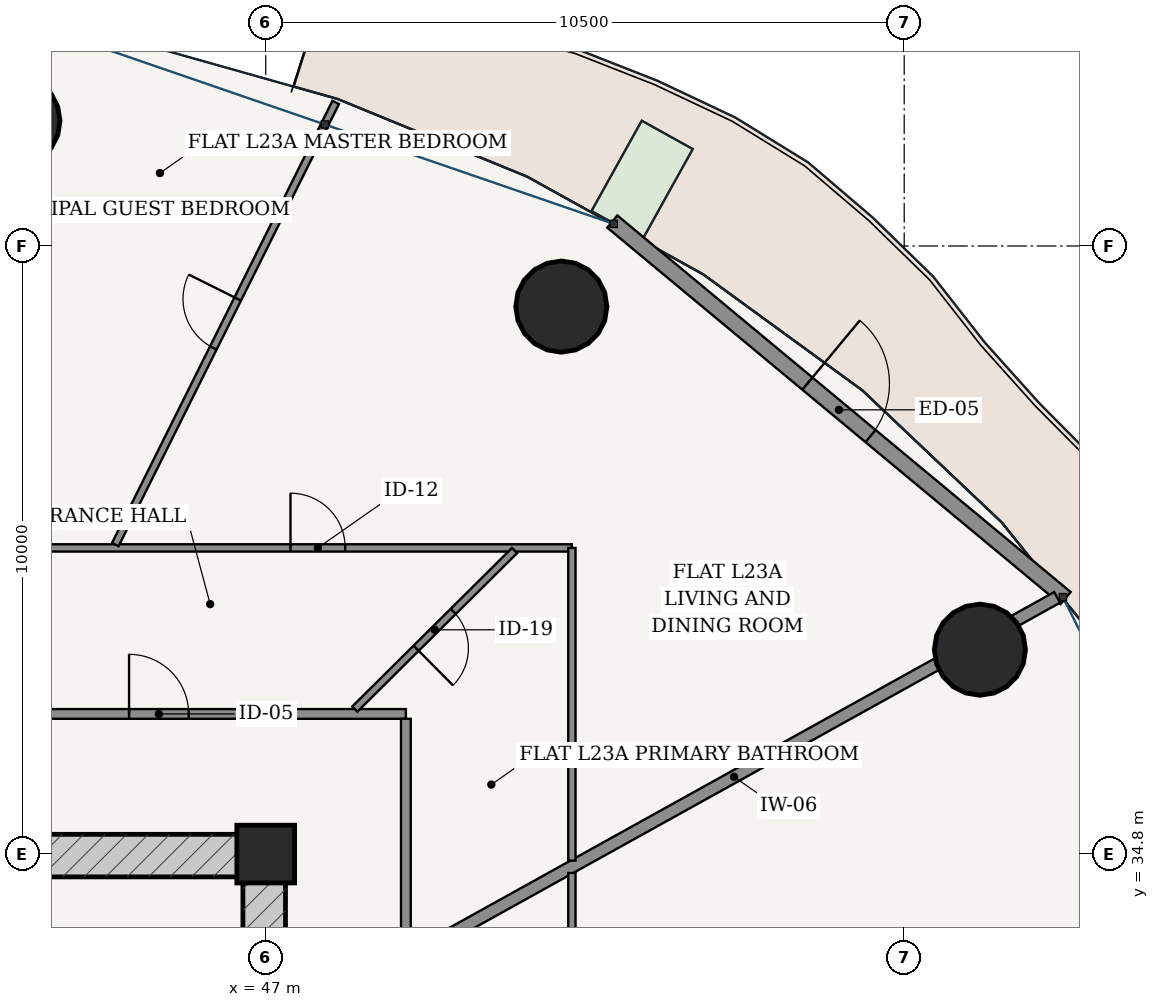
"""IFC4 building model, lengths in metres.
Left out: names, types, materials, properties, quantities, classifications, styles, units other than length and angle.
Written with IfcOpenShell. Run it as: python <this file> out.ifc"""

import sys

from ifc_helpers import new_model, si_unit, direction, frame, frame_2d, origin, origin_2d, place, context, subcontext, project, spatial, rectangle, hollow_circle, extrude, source, transform, mapped, element, fill, save


model = new_model("IFC4")
c1 = context("Model", 3, precision=1e-05, world=origin(), true_north=direction((-0.2419218956, 0.970295726276)))
c2 = subcontext(c1, "Body", "Model", "MODEL_VIEW")
j1 = project(units=[si_unit("LENGTHUNIT", "METRE"), si_unit("PLANEANGLEUNIT", "RADIAN")], contexts=[c1])
p1 = place(None, origin())
s1 = spatial("IfcSite", under=j1, at=p1, CompositionType="ELEMENT")
p2 = place(p1, origin())
s2 = spatial("IfcBuilding", under=s1, at=p2, CompositionType="ELEMENT")
p3 = place(p2, frame((0.0, 0.0, 90.6)))
s3 = spatial("IfcBuildingStorey", under=s2, at=p3, CompositionType="ELEMENT", Elevation=90.6)
p4 = place(p3, frame((47.0, 34.8, 0.0), z_axis=(0.0, 0.0, 1.0), x_axis=(1.0, 0.0, 0.0)))
e1 = element("IfcColumn", 1, at=p4, inside=s3, PredefinedType="COLUMN", context=c2, shape_type="SweptSolid", body=[
    extrude(rectangle(XDim=0.95, YDim=0.95, at=origin_2d()), origin(), (0.0, 0.0, 1.0), 3.6),
])
p5 = place(p3, frame((28.675, 34.775, 0.0), z_axis=(0.0, 0.0, 1.0), x_axis=(1.0, 0.0, 0.0)))
e2 = element("IfcWall", 2, at=p5, inside=s3, PredefinedType="SHEAR", context=c2, shape_type="SweptSolid", body=[
    extrude(rectangle(XDim=18.65, YDim=0.7, at=frame_2d((9.325, 0.0))), origin(), (0.0, 0.0, 1.0), 3.325),
])
p6 = place(p5, frame((8.9, 0.0, 0.0)))
e3 = element("IfcOpeningElement", 3, at=p6, cuts=e2, PredefinedType="OPENING", context=c2, shape_type="SweptSolid", body=[
    extrude(rectangle(XDim=0.85, YDim=2.1, at=frame_2d((0.425, 1.05))), frame((0.0, 0.36, 0.0), z_axis=(0.0, -1.0, 0.0), x_axis=(1.0, 0.0, 0.0)), (0.0, 0.0, 1.0), 0.72),
])
p7 = place(p3, frame((46.975, 19.175, 0.0), z_axis=(0.0, 0.0, 1.0), x_axis=(0.0, 1.0, 0.0)))
e4 = element("IfcWall", 4, at=p7, inside=s3, PredefinedType="SHEAR", context=c2, shape_type="SweptSolid", body=[
    extrude(rectangle(XDim=15.25, YDim=0.7, at=frame_2d((7.625, 0.0))), origin(), (0.0, 0.0, 1.0), 3.325),
])
p8 = place(p7, frame((9.875, 0.0, 0.0)))
e5 = element("IfcOpeningElement", 5, at=p8, cuts=e4, PredefinedType="OPENING", context=c2, shape_type="SweptSolid", body=[
    extrude(rectangle(XDim=1.5, YDim=2.2, at=frame_2d((0.75, 1.1))), frame((0.0, 0.36, 0.0), z_axis=(0.0, -1.0, 0.0), x_axis=(1.0, 0.0, 0.0)), (0.0, 0.0, 1.0), 0.72),
])
for number, where, z_axis, x_axis in (
    (6, (58.745, 38.161, 0.0), (0.0, 0.0, 1.0), (1.0, 0.0, 0.0)),
    (7, (51.862, 43.803, 0.0), (0.0, 0.0, 1.0), (1.0, 0.0, 0.0)),
    (8, (42.867, 46.857, 0.0), (0.0, 0.0, 1.0), (1.0, 0.0, 0.0)),
):
    element("IfcColumn", number, at=place(p3, frame(where, z_axis=z_axis, x_axis=x_axis)), inside=s3, PredefinedType="COLUMN", context=c2, shape_type="SweptSolid", body=[
        extrude(hollow_circle(Radius=0.75, WallThickness=0.045, at=origin_2d()), origin(), (0.0, 0.0, 1.0), 3.6),
    ])
p9 = place(p3, frame((60.154, 39.01, 0.0), z_axis=(0.0, 0.0, 1.0), x_axis=(-0.769242574941, 0.638956853706, 0.0)))
e9 = element("IfcWall", 9, at=p9, inside=s3, PredefinedType="SOLIDWALL", context=c2, shape_type="SweptSolid", body=[
    extrude(rectangle(XDim=9.69, YDim=0.26, at=frame_2d((4.845, 0.0))), origin(), (0.0, 0.0, 1.0), 3.325),
])
p10 = place(p9, frame((4.17, 0.0, 0.0)))
e10 = element("IfcOpeningElement", 10, at=p10, cuts=e9, PredefinedType="OPENING", context=c2, shape_type="SweptSolid", body=[
    extrude(rectangle(XDim=1.35, YDim=2.2, at=frame_2d((0.675, 1.1))), frame((0.0, 0.14, 0.0), z_axis=(0.0, -1.0, 0.0), x_axis=(1.0, 0.0, 0.0)), (0.0, 0.0, 1.0), 0.28),
])
p11 = place(p3, frame((26.695, 37.105, 0.0), z_axis=(0.0, 0.0, 1.0), x_axis=(1.0, 0.0, 0.0)))
e11 = element("IfcWall", 11, at=p11, inside=s3, PredefinedType="PARTITIONING", context=c2, shape_type="SweptSolid", body=[
    extrude(rectangle(XDim=22.61, YDim=0.16, at=frame_2d((11.305, 0.0))), origin(), (0.0, 0.0, 1.0), 2.767),
])
p12 = place(p11, frame((18.058, 0.0, 0.0)))
e12 = element("IfcOpeningElement", 12, at=p12, cuts=e11, PredefinedType="OPENING", context=c2, shape_type="SweptSolid", body=[
    extrude(rectangle(XDim=0.98, YDim=2.2, at=frame_2d((0.49, 1.1))), frame((0.0, 0.09, 0.0), z_axis=(0.0, -1.0, 0.0), x_axis=(1.0, 0.0, 0.0)), (0.0, 0.0, 1.0), 0.18),
])
p13 = place(p3, frame((49.305, 16.575, 0.0), z_axis=(0.0, 0.0, 1.0), x_axis=(0.0, 1.0, 0.0)))
e13 = element("IfcWall", 13, at=p13, inside=s3, PredefinedType="PARTITIONING", context=c2, shape_type="SweptSolid", body=[
    extrude(rectangle(XDim=20.45, YDim=0.16, at=frame_2d((10.225, 0.0))), origin(), (0.0, 0.0, 1.0), 2.767),
])
p14 = place(p3, frame((49.387, 33.121, 0.0), z_axis=(0.0, 0.0, 1.0), x_axis=(0.874320165728, 0.485349613992, 0.0)))
e14 = element("IfcWall", 14, at=p14, inside=s3, PredefinedType="PARTITIONING", context=c2, shape_type="SweptSolid", body=[
    extrude(rectangle(XDim=12.156, YDim=0.2, at=frame_2d((6.078, 0.0))), origin(), (0.0, 0.0, 1.0), 2.767),
])
p15 = place(p3, frame((23.965, 39.835, 0.0), z_axis=(0.0, 0.0, 1.0), x_axis=(1.0, 0.0, 0.0)))
e15 = element("IfcWall", 15, at=p15, inside=s3, PredefinedType="PARTITIONING", context=c2, shape_type="SweptSolid", body=[
    extrude(rectangle(XDim=28.07, YDim=0.12, at=frame_2d((14.035, 0.0))), origin(), (0.0, 0.0, 1.0), 2.767),
])
p16 = place(p15, frame((23.442, 0.0, 0.0)))
e16 = element("IfcOpeningElement", 16, at=p16, cuts=e15, PredefinedType="OPENING", context=c2, shape_type="SweptSolid", body=[
    extrude(rectangle(XDim=0.9, YDim=2.15, at=frame_2d((0.45, 1.075))), frame((0.0, 0.07, 0.0), z_axis=(0.0, -1.0, 0.0), x_axis=(1.0, 0.0, 0.0)), (0.0, 0.0, 1.0), 0.14),
])
p17 = place(p3, frame((52.035, 39.835, 0.0), z_axis=(0.0, 0.0, 1.0), x_axis=(0.0, -1.0, 0.0)))
e17 = element("IfcWall", 17, at=p17, inside=s3, PredefinedType="PARTITIONING", context=c2, shape_type="SweptSolid", body=[
    extrude(rectangle(XDim=5.142, YDim=0.12, at=frame_2d((2.571, 0.0))), origin(), (0.0, 0.0, 1.0), 3.004),
])
p18 = place(p3, frame((44.526, 39.89, 0.0), z_axis=(0.0, 0.0, 1.0), x_axis=(0.446167584581, 0.894949432353, 0.0)))
e18 = element("IfcWall", 18, at=p18, inside=s3, PredefinedType="PARTITIONING", context=c2, shape_type="SweptSolid", body=[
    extrude(rectangle(XDim=8.125, YDim=0.12, at=frame_2d((4.062, 0.0))), origin(), (0.0, 0.0, 1.0), 2.767),
])
p19 = place(p18, frame((3.612, 0.0, 0.0)))
e19 = element("IfcOpeningElement", 19, at=p19, cuts=e18, PredefinedType="OPENING", context=c2, shape_type="SweptSolid", body=[
    extrude(rectangle(XDim=0.9, YDim=2.15, at=frame_2d((0.45, 1.075))), frame((0.0, 0.07, 0.0), z_axis=(0.0, -1.0, 0.0), x_axis=(1.0, 0.0, 0.0)), (0.0, 0.0, 1.0), 0.14),
])
p20 = place(p3, frame((48.465, 37.185, 0.0), z_axis=(0.0, 0.0, 1.0), x_axis=(0.709839752998, 0.704363205359, 0.0)))
e20 = element("IfcWall", 20, at=p20, inside=s3, PredefinedType="PARTITIONING", context=c2, shape_type="SweptSolid", body=[
    extrude(rectangle(XDim=3.7, YDim=0.12, at=frame_2d((1.85, 0.0))), origin(), (0.0, 0.0, 1.0), 2.767),
])
p21 = place(p20, frame((1.42, 0.0, 0.0)))
e21 = element("IfcOpeningElement", 21, at=p21, cuts=e20, PredefinedType="OPENING", context=c2, shape_type="SweptSolid", body=[
    extrude(rectangle(XDim=0.86, YDim=2.15, at=frame_2d((0.43, 1.075))), frame((0.0, 0.07, 0.0), z_axis=(0.0, -1.0, 0.0), x_axis=(1.0, 0.0, 0.0)), (0.0, 0.0, 1.0), 0.14),
])
p22 = place(p3, frame((52.035, 34.49, 0.0), z_axis=(0.0, 0.0, 1.0), x_axis=(0.0, -1.0, 0.0)))
e22 = element("IfcWall", 22, at=p22, inside=s3, PredefinedType="PARTITIONING", context=c2, shape_type="SweptSolid", body=[
    extrude(rectangle(XDim=20.725, YDim=0.12, at=frame_2d((10.362, 0.0))), origin(), (0.0, 0.0, 1.0), 2.767),
])
p23 = place(p22, frame((17.493, 0.0, 0.0)))
e23 = element("IfcOpeningElement", 23, at=p23, cuts=e22, PredefinedType="OPENING", context=c2, shape_type="SweptSolid", body=[
    extrude(rectangle(XDim=0.9, YDim=2.15, at=frame_2d((0.45, 1.075))), frame((0.0, 0.07, 0.0), z_axis=(0.0, -1.0, 0.0), x_axis=(1.0, 0.0, 0.0)), (0.0, 0.0, 1.0), 0.14),
])
p24 = place(p22, frame((14.064, 0.0, 0.0)))
e24 = element("IfcOpeningElement", 24, at=p24, cuts=e22, PredefinedType="OPENING", context=c2, shape_type="SweptSolid", body=[
    extrude(rectangle(XDim=0.9, YDim=2.15, at=frame_2d((0.45, 1.075))), frame((0.0, 0.07, 0.0), z_axis=(0.0, -1.0, 0.0), x_axis=(1.0, 0.0, 0.0)), (0.0, 0.0, 1.0), 0.14),
])
m1 = source(origin(), c2, "Body", "SweptSolid", [
    extrude(rectangle(XDim=1.35, YDim=2.2, at=frame_2d((0.675, 1.1))), frame((0.0, 0.025, 0.0), z_axis=(0.0, -1.0, 0.0), x_axis=(1.0, 0.0, 0.0)), (0.0, 0.0, 1.0), 0.05),
])
p25 = place(p10, frame((1.35, 0.0, 0.0), z_axis=(0.0, 0.0, 1.0), x_axis=(-1.0, 0.0, 0.0)))
e25 = element("IfcDoor", 25, at=p25, inside=s3, OperationType="SINGLE_SWING_LEFT", PredefinedType="DOOR", context=c2, shape_type="MappedRepresentation", body=[
    mapped(m1, transform((0.0, 0.0, 0.0), scale=1.0)),
])
fill(e10, e25)
m2 = source(origin(), c2, "Body", "SweptSolid", [
    extrude(rectangle(XDim=0.98, YDim=2.2, at=frame_2d((0.49, 1.1))), frame((0.0, 0.025, 0.0), z_axis=(0.0, -1.0, 0.0), x_axis=(1.0, 0.0, 0.0)), (0.0, 0.0, 1.0), 0.05),
])
p26 = place(p12, origin())
e26 = element("IfcDoor", 26, at=p26, inside=s3, OperationType="SINGLE_SWING_LEFT", PredefinedType="DOOR", context=c2, shape_type="MappedRepresentation", body=[
    mapped(m2, transform((0.0, 0.0, 0.0), scale=1.0)),
])
fill(e12, e26)
m3 = source(origin(), c2, "Body", "SweptSolid", [
    extrude(rectangle(XDim=0.86, YDim=2.15, at=frame_2d((0.43, 1.075))), frame((0.0, 0.025, 0.0), z_axis=(0.0, -1.0, 0.0), x_axis=(1.0, 0.0, 0.0)), (0.0, 0.0, 1.0), 0.05),
])
p27 = place(p21, frame((0.86, 0.0, 0.0), z_axis=(0.0, 0.0, 1.0), x_axis=(-1.0, 0.0, 0.0)))
e27 = element("IfcDoor", 27, at=p27, inside=s3, OperationType="SINGLE_SWING_RIGHT", PredefinedType="DOOR", context=c2, shape_type="MappedRepresentation", body=[
    mapped(m3, transform((0.0, 0.0, 0.0), scale=1.0)),
])
fill(e21, e27)
m4 = source(origin(), c2, "Body", "SweptSolid", [
    extrude(rectangle(XDim=0.9, YDim=2.15, at=frame_2d((0.45, 1.075))), frame((0.0, 0.025, 0.0), z_axis=(0.0, -1.0, 0.0), x_axis=(1.0, 0.0, 0.0)), (0.0, 0.0, 1.0), 0.05),
])
p28 = place(p16, origin())
e28 = element("IfcDoor", 28, at=p28, inside=s3, OperationType="SINGLE_SWING_LEFT", PredefinedType="DOOR", context=c2, shape_type="MappedRepresentation", body=[
    mapped(m4, transform((0.0, 0.0, 0.0), scale=1.0)),
])
fill(e16, e28)
p29 = place(p19, origin())
e29 = element("IfcDoor", 29, at=p29, inside=s3, OperationType="SINGLE_SWING_RIGHT", PredefinedType="DOOR", context=c2, shape_type="MappedRepresentation", body=[
    mapped(m4, transform((0.0, 0.0, 0.0), scale=1.0)),
])
fill(e19, e29)
save(model, sys.argv[1])
